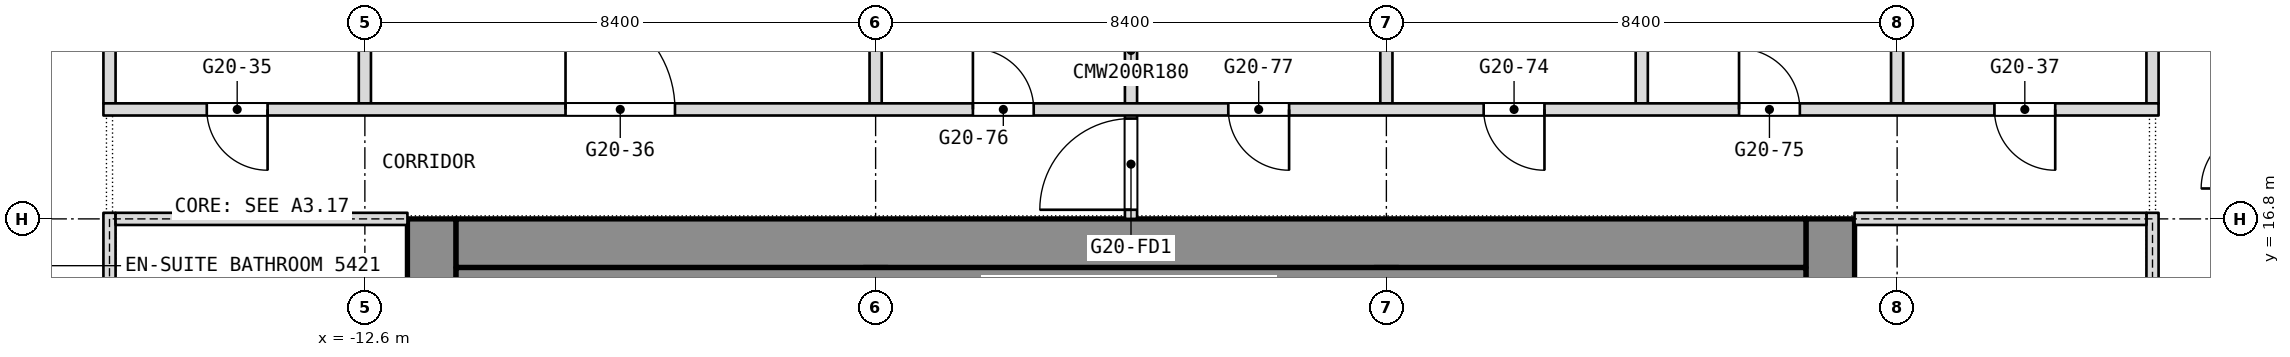
"""IFC4 building model, lengths in metres.
Left out: names, types, materials, properties, quantities, classifications, styles, units other than length and angle.
Written with IfcOpenShell. Run it as: python <this file> out.ifc"""

import sys

from ifc_helpers import new_model, si_unit, direction, frame, frame_2d, origin, place, context, subcontext, project, spatial, rectangle, extrude, element, fill, save


model = new_model("IFC4")
c1 = context("Model", 3, precision=1e-05, world=origin(), true_north=direction((0.0, 1.0)))
c2 = subcontext(c1, "Body", "Model", "MODEL_VIEW")
j1 = project(units=[si_unit("LENGTHUNIT", "METRE"), si_unit("PLANEANGLEUNIT", "RADIAN")], contexts=[c1])
p1 = place(None, origin())
s1 = spatial("IfcSite", under=j1, at=p1, CompositionType="ELEMENT")
p2 = place(p1, origin())
s2 = spatial("IfcBuilding", under=s1, at=p2, CompositionType="ELEMENT")
p3 = place(p2, frame((0.0, 0.0, 230.9)))
s3 = spatial("IfcBuildingStorey", under=s2, at=p3, CompositionType="ELEMENT", Elevation=230.9)
p4 = place(p3, frame((11.5, 0.0, 0.0), z_axis=(0.0, 0.0, 1.0), x_axis=(0.0, 1.0, 0.0)))
e1 = element("IfcWall", 1, at=p4, inside=s3, PredefinedType="SHEAR", context=c2, shape_type="SweptSolid", body=[
    extrude(rectangle(XDim=16.8, YDim=0.8, at=frame_2d((8.4, 0.0))), origin(), (0.0, 0.0, 1.0), 3.6),
])
p5 = place(p4, frame((2.3, 0.0, 0.0)))
e2 = element("IfcOpeningElement", 2, at=p5, cuts=e1, PredefinedType="OPENING", context=c2, shape_type="SweptSolid", body=[
    extrude(rectangle(XDim=1.1, YDim=2.1, at=frame_2d((0.55, 1.05))), frame((0.0, 0.4, 0.0), z_axis=(0.0, -1.0, 0.0), x_axis=(1.0, 0.0, 0.0)), (0.0, 0.0, 1.0), 0.8),
])
p6 = place(p4, frame((4.85, 0.0, 0.0)))
e3 = element("IfcOpeningElement", 3, at=p6, cuts=e1, PredefinedType="OPENING", context=c2, shape_type="SweptSolid", body=[
    extrude(rectangle(XDim=1.1, YDim=2.1, at=frame_2d((0.55, 1.05))), frame((0.0, 0.4, 0.0), z_axis=(0.0, -1.0, 0.0), x_axis=(1.0, 0.0, 0.0)), (0.0, 0.0, 1.0), 0.8),
])
p7 = place(p4, frame((6.825, 0.0, 0.0)))
e4 = element("IfcOpeningElement", 4, at=p7, cuts=e1, PredefinedType="OPENING", context=c2, shape_type="SweptSolid", body=[
    extrude(rectangle(XDim=1.2, YDim=2.1, at=frame_2d((0.6, 1.05))), frame((0.0, 0.4, 0.0), z_axis=(0.0, -1.0, 0.0), x_axis=(1.0, 0.0, 0.0)), (0.0, 0.0, 1.0), 0.8),
])
p8 = place(p4, frame((13.4, 0.0, 0.0)))
e5 = element("IfcOpeningElement", 5, at=p8, cuts=e1, PredefinedType="OPENING", context=c2, shape_type="SweptSolid", body=[
    extrude(rectangle(XDim=1.1, YDim=2.1, at=frame_2d((0.55, 1.05))), frame((0.0, 0.4, 0.0), z_axis=(0.0, -1.0, 0.0), x_axis=(1.0, 0.0, 0.0)), (0.0, 0.0, 1.0), 0.8),
])
p9 = place(p4, frame((10.85, 0.0, 0.0)))
e6 = element("IfcOpeningElement", 6, at=p9, cuts=e1, PredefinedType="OPENING", context=c2, shape_type="SweptSolid", body=[
    extrude(rectangle(XDim=1.1, YDim=2.1, at=frame_2d((0.55, 1.05))), frame((0.0, 0.4, 0.0), z_axis=(0.0, -1.0, 0.0), x_axis=(1.0, 0.0, 0.0)), (0.0, 0.0, 1.0), 0.8),
])
p10 = place(p4, frame((8.775, 0.0, 0.0)))
e7 = element("IfcOpeningElement", 7, at=p10, cuts=e1, PredefinedType="OPENING", context=c2, shape_type="SweptSolid", body=[
    extrude(rectangle(XDim=1.2, YDim=2.1, at=frame_2d((0.6, 1.05))), frame((0.0, 0.4, 0.0), z_axis=(0.0, -1.0, 0.0), x_axis=(1.0, 0.0, 0.0)), (0.0, 0.0, 1.0), 0.8),
])
p11 = place(p3, frame((-11.5, 0.0, 0.0), z_axis=(0.0, 0.0, 1.0), x_axis=(0.0, 1.0, 0.0)))
e8 = element("IfcWall", 8, at=p11, inside=s3, PredefinedType="SHEAR", context=c2, shape_type="SweptSolid", body=[
    extrude(rectangle(XDim=16.8, YDim=0.8, at=frame_2d((8.4, 0.0))), origin(), (0.0, 0.0, 1.0), 3.6),
])
p12 = place(p11, frame((3.6, 0.0, 0.0)))
e9 = element("IfcOpeningElement", 9, at=p12, cuts=e8, PredefinedType="OPENING", context=c2, shape_type="SweptSolid", body=[
    extrude(rectangle(XDim=0.9, YDim=2.1, at=frame_2d((0.45, 1.05))), frame((0.0, 0.4, 0.0), z_axis=(0.0, -1.0, 0.0), x_axis=(1.0, 0.0, 0.0)), (0.0, 0.0, 1.0), 0.8),
])
p13 = place(p11, frame((6.825, 0.0, 0.0)))
e10 = element("IfcOpeningElement", 10, at=p13, cuts=e8, PredefinedType="OPENING", context=c2, shape_type="SweptSolid", body=[
    extrude(rectangle(XDim=1.2, YDim=2.1, at=frame_2d((0.6, 1.05))), frame((0.0, 0.4, 0.0), z_axis=(0.0, -1.0, 0.0), x_axis=(1.0, 0.0, 0.0)), (0.0, 0.0, 1.0), 0.8),
])
p14 = place(p11, frame((14.212, 0.0, 0.0)))
e11 = element("IfcOpeningElement", 11, at=p14, cuts=e8, PredefinedType="OPENING", context=c2, shape_type="SweptSolid", body=[
    extrude(rectangle(XDim=0.9, YDim=2.1, at=frame_2d((0.45, 1.05))), frame((0.0, 0.4, 0.0), z_axis=(0.0, -1.0, 0.0), x_axis=(1.0, 0.0, 0.0)), (0.0, 0.0, 1.0), 0.8),
])
p15 = place(p11, frame((11.587, 0.0, 0.0)))
e12 = element("IfcOpeningElement", 12, at=p15, cuts=e8, PredefinedType="OPENING", context=c2, shape_type="SweptSolid", body=[
    extrude(rectangle(XDim=0.9, YDim=2.1, at=frame_2d((0.45, 1.05))), frame((0.0, 0.4, 0.0), z_axis=(0.0, -1.0, 0.0), x_axis=(1.0, 0.0, 0.0)), (0.0, 0.0, 1.0), 0.8),
])
p16 = place(p11, frame((8.775, 0.0, 0.0)))
e13 = element("IfcOpeningElement", 13, at=p16, cuts=e8, PredefinedType="OPENING", context=c2, shape_type="SweptSolid", body=[
    extrude(rectangle(XDim=1.2, YDim=2.1, at=frame_2d((0.6, 1.05))), frame((0.0, 0.4, 0.0), z_axis=(0.0, -1.0, 0.0), x_axis=(1.0, 0.0, 0.0)), (0.0, 0.0, 1.0), 0.8),
])
p17 = place(p3, frame((-11.1, 16.4, 0.0), z_axis=(0.0, 0.0, 1.0), x_axis=(1.0, 0.0, 0.0)))
e14 = element("IfcWall", 14, at=p17, inside=s3, PredefinedType="SHEAR", context=c2, shape_type="SweptSolid", body=[
    extrude(rectangle(XDim=22.2, YDim=0.8, at=frame_2d((11.1, 0.0))), origin(), (0.0, 0.0, 1.0), 3.6),
])
p18 = place(p3, frame((-4.2, 0.8, 0.0), z_axis=(0.0, 0.0, 1.0), x_axis=(0.0, 1.0, 0.0)))
e15 = element("IfcWall", 15, at=p18, inside=s3, PredefinedType="SHEAR", context=c2, shape_type="SweptSolid", body=[
    extrude(rectangle(XDim=15.2, YDim=0.4, at=frame_2d((7.6, 0.0))), origin(), (0.0, 0.0, 1.0), 3.6),
])
p19 = place(p18, frame((8.5, 0.0, 0.0)))
e16 = element("IfcOpeningElement", 16, at=p19, cuts=e15, PredefinedType="OPENING", context=c2, shape_type="SweptSolid", body=[
    extrude(rectangle(XDim=1.2, YDim=2.1, at=frame_2d((0.6, 1.05))), frame((0.0, 0.2, 0.0), z_axis=(0.0, -1.0, 0.0), x_axis=(1.0, 0.0, 0.0)), (0.0, 0.0, 1.0), 0.4),
])
p20 = place(p3, frame((4.2, 0.8, 0.0), z_axis=(0.0, 0.0, 1.0), x_axis=(0.0, 1.0, 0.0)))
e17 = element("IfcWall", 17, at=p20, inside=s3, PredefinedType="SHEAR", context=c2, shape_type="SweptSolid", body=[
    extrude(rectangle(XDim=15.2, YDim=0.4, at=frame_2d((7.6, 0.0))), origin(), (0.0, 0.0, 1.0), 3.6),
])
p21 = place(p20, frame((5.95, 0.0, 0.0)))
e18 = element("IfcOpeningElement", 18, at=p21, cuts=e17, PredefinedType="OPENING", context=c2, shape_type="SweptSolid", body=[
    extrude(rectangle(XDim=1.2, YDim=2.1, at=frame_2d((0.6, 1.05))), frame((0.0, 0.2, 0.0), z_axis=(0.0, -1.0, 0.0), x_axis=(1.0, 0.0, 0.0)), (0.0, 0.0, 1.0), 0.4),
])
for number, where, z_axis, x_axis in (
    (19, (16.8, 18.7, 0.0), (0.0, 0.0, 1.0), (0.0, 1.0, 0.0)),
    (20, (12.6, 18.7, 0.0), (0.0, 0.0, 1.0), (0.0, 1.0, 0.0)),
    (21, (8.4, 18.7, 0.0), (0.0, 0.0, 1.0), (0.0, 1.0, 0.0)),
    (22, (4.2, 18.7, 0.0), (0.0, 0.0, 1.0), (0.0, 1.0, 0.0)),
):
    element("IfcWall", number, at=place(p3, frame(where, z_axis=z_axis, x_axis=x_axis)), inside=s3, PredefinedType="PARTITIONING", context=c2, shape_type="SweptSolid", body=[
        extrude(rectangle(XDim=3.64, YDim=0.2, at=frame_2d((1.82, 0.0))), origin(), (0.0, 0.0, 1.0), 3.34),
    ])
p22 = place(p3, frame((0.0, 16.8, 0.0), z_axis=(0.0, 0.0, 1.0), x_axis=(0.0, 1.0, 0.0)))
e23 = element("IfcWall", 23, at=p22, inside=s3, PredefinedType="PARTITIONING", context=c2, shape_type="SweptSolid", body=[
    extrude(rectangle(XDim=5.54, YDim=0.2, at=frame_2d((2.77, 0.0))), origin(), (0.0, 0.0, 1.0), 3.34),
])
p23 = place(p22, frame((0.15, 0.0, 0.0)))
e24 = element("IfcOpeningElement", 24, at=p23, cuts=e23, PredefinedType="OPENING", context=c2, shape_type="SweptSolid", body=[
    extrude(rectangle(XDim=1.5, YDim=2.1, at=frame_2d((0.75, 1.05))), frame((0.0, 0.1, 0.0), z_axis=(0.0, -1.0, 0.0), x_axis=(1.0, 0.0, 0.0)), (0.0, 0.0, 1.0), 0.2),
])
for number, where, z_axis, x_axis in (
    (25, (-4.2, 18.7, 0.0), (0.0, 0.0, 1.0), (0.0, 1.0, 0.0)),
    (26, (-12.6, 18.7, 0.0), (0.0, 0.0, 1.0), (0.0, 1.0, 0.0)),
    (27, (-16.8, 18.7, 0.0), (0.0, 0.0, 1.0), (0.0, 1.0, 0.0)),
):
    element("IfcWall", number, at=place(p3, frame(where, z_axis=z_axis, x_axis=x_axis)), inside=s3, PredefinedType="PARTITIONING", context=c2, shape_type="SweptSolid", body=[
        extrude(rectangle(XDim=3.64, YDim=0.2, at=frame_2d((1.82, 0.0))), origin(), (0.0, 0.0, 1.0), 3.34),
    ])
p24 = place(p3, frame((-16.9, 18.6, 0.0), z_axis=(0.0, 0.0, 1.0), x_axis=(1.0, 0.0, 0.0)))
e28 = element("IfcWall", 28, at=p24, inside=s3, PredefinedType="PARTITIONING", context=c2, shape_type="SweptSolid", body=[
    extrude(rectangle(XDim=33.8, YDim=0.2, at=frame_2d((16.9, 0.0))), origin(), (0.0, 0.0, 1.0), 3.34),
])
p25 = place(p24, frame((1.7, 0.0, 0.0)))
e29 = element("IfcOpeningElement", 29, at=p25, cuts=e28, PredefinedType="OPENING", context=c2, shape_type="SweptSolid", body=[
    extrude(rectangle(XDim=1.0, YDim=2.1, at=frame_2d((0.5, 1.05))), frame((0.0, 0.1, 0.0), z_axis=(0.0, -1.0, 0.0), x_axis=(1.0, 0.0, 0.0)), (0.0, 0.0, 1.0), 0.2),
])
p26 = place(p24, frame((7.6, 0.0, 0.0)))
e30 = element("IfcOpeningElement", 30, at=p26, cuts=e28, PredefinedType="OPENING", context=c2, shape_type="SweptSolid", body=[
    extrude(rectangle(XDim=1.8, YDim=2.1, at=frame_2d((0.9, 1.05))), frame((0.0, 0.1, 0.0), z_axis=(0.0, -1.0, 0.0), x_axis=(1.0, 0.0, 0.0)), (0.0, 0.0, 1.0), 0.2),
])
p27 = place(p24, frame((31.1, 0.0, 0.0)))
e31 = element("IfcOpeningElement", 31, at=p27, cuts=e28, PredefinedType="OPENING", context=c2, shape_type="SweptSolid", body=[
    extrude(rectangle(XDim=1.0, YDim=2.1, at=frame_2d((0.5, 1.05))), frame((0.0, 0.1, 0.0), z_axis=(0.0, -1.0, 0.0), x_axis=(1.0, 0.0, 0.0)), (0.0, 0.0, 1.0), 0.2),
])
p28 = place(p24, frame((22.7, 0.0, 0.0)))
e32 = element("IfcOpeningElement", 32, at=p28, cuts=e28, PredefinedType="OPENING", context=c2, shape_type="SweptSolid", body=[
    extrude(rectangle(XDim=1.0, YDim=2.1, at=frame_2d((0.5, 1.05))), frame((0.0, 0.1, 0.0), z_axis=(0.0, -1.0, 0.0), x_axis=(1.0, 0.0, 0.0)), (0.0, 0.0, 1.0), 0.2),
])
p29 = place(p24, frame((26.9, 0.0, 0.0)))
e33 = element("IfcOpeningElement", 33, at=p29, cuts=e28, PredefinedType="OPENING", context=c2, shape_type="SweptSolid", body=[
    extrude(rectangle(XDim=1.0, YDim=2.1, at=frame_2d((0.5, 1.05))), frame((0.0, 0.1, 0.0), z_axis=(0.0, -1.0, 0.0), x_axis=(1.0, 0.0, 0.0)), (0.0, 0.0, 1.0), 0.2),
])
p30 = place(p24, frame((14.3, 0.0, 0.0)))
e34 = element("IfcOpeningElement", 34, at=p30, cuts=e28, PredefinedType="OPENING", context=c2, shape_type="SweptSolid", body=[
    extrude(rectangle(XDim=1.0, YDim=2.1, at=frame_2d((0.5, 1.05))), frame((0.0, 0.1, 0.0), z_axis=(0.0, -1.0, 0.0), x_axis=(1.0, 0.0, 0.0)), (0.0, 0.0, 1.0), 0.2),
])
p31 = place(p24, frame((18.5, 0.0, 0.0)))
e35 = element("IfcOpeningElement", 35, at=p31, cuts=e28, PredefinedType="OPENING", context=c2, shape_type="SweptSolid", body=[
    extrude(rectangle(XDim=1.0, YDim=2.1, at=frame_2d((0.5, 1.05))), frame((0.0, 0.1, 0.0), z_axis=(0.0, -1.0, 0.0), x_axis=(1.0, 0.0, 0.0)), (0.0, 0.0, 1.0), 0.2),
])
p32 = place(p3, frame((-11.1, 15.65, 0.0), z_axis=(0.0, 0.0, 1.0), x_axis=(1.0, 0.0, 0.0)))
e36 = element("IfcWall", 36, at=p32, inside=s3, PredefinedType="PARTITIONING", context=c2, shape_type="SweptSolid", body=[
    extrude(rectangle(XDim=22.2, YDim=0.7, at=frame_2d((11.1, 0.0))), origin(), (0.0, 0.0, 1.0), 3.34),
])
p33 = place(p3, frame((-16.8, -0.1, 0.0), z_axis=(0.0, 0.0, 1.0), x_axis=(0.0, 1.0, 0.0)))
e37 = element("IfcWall", 37, at=p33, inside=s3, PredefinedType="PARTITIONING", context=c2, shape_type="SweptSolid", body=[
    extrude(rectangle(XDim=17.0, YDim=0.2, at=frame_2d((8.5, 0.0))), origin(), (0.0, 0.0, 1.0), 3.34),
])
p34 = place(p33, frame((2.2, 0.0, 0.0)))
e38 = element("IfcOpeningElement", 38, at=p34, cuts=e37, PredefinedType="OPENING", context=c2, shape_type="SweptSolid", body=[
    extrude(rectangle(XDim=1.8, YDim=2.1, at=frame_2d((0.9, 1.05))), frame((0.0, 0.1, 0.0), z_axis=(0.0, -1.0, 0.0), x_axis=(1.0, 0.0, 0.0)), (0.0, 0.0, 1.0), 0.2),
])
p35 = place(p33, frame((13.0, 0.0, 0.0)))
e39 = element("IfcOpeningElement", 39, at=p35, cuts=e37, PredefinedType="OPENING", context=c2, shape_type="SweptSolid", body=[
    extrude(rectangle(XDim=1.8, YDim=2.1, at=frame_2d((0.9, 1.05))), frame((0.0, 0.1, 0.0), z_axis=(0.0, -1.0, 0.0), x_axis=(1.0, 0.0, 0.0)), (0.0, 0.0, 1.0), 0.2),
])
p36 = place(p3, frame((-16.7, 16.8, 0.0), z_axis=(0.0, 0.0, 1.0), x_axis=(1.0, 0.0, 0.0)))
e40 = element("IfcWall", 40, at=p36, inside=s3, PredefinedType="PARTITIONING", context=c2, shape_type="SweptSolid", body=[
    extrude(rectangle(XDim=4.8, YDim=0.2, at=frame_2d((2.4, 0.0))), origin(), (0.0, 0.0, 1.0), 2.94),
])
p37 = place(p3, frame((16.8, -0.1, 0.0), z_axis=(0.0, 0.0, 1.0), x_axis=(0.0, 1.0, 0.0)))
e41 = element("IfcWall", 41, at=p37, inside=s3, PredefinedType="PARTITIONING", context=c2, shape_type="SweptSolid", body=[
    extrude(rectangle(XDim=17.0, YDim=0.2, at=frame_2d((8.5, 0.0))), origin(), (0.0, 0.0, 1.0), 3.34),
])
p38 = place(p37, frame((2.2, 0.0, 0.0)))
e42 = element("IfcOpeningElement", 42, at=p38, cuts=e41, PredefinedType="OPENING", context=c2, shape_type="SweptSolid", body=[
    extrude(rectangle(XDim=1.8, YDim=2.1, at=frame_2d((0.9, 1.05))), frame((0.0, 0.1, 0.0), z_axis=(0.0, -1.0, 0.0), x_axis=(1.0, 0.0, 0.0)), (0.0, 0.0, 1.0), 0.2),
])
p39 = place(p37, frame((13.0, 0.0, 0.0)))
e43 = element("IfcOpeningElement", 43, at=p39, cuts=e41, PredefinedType="OPENING", context=c2, shape_type="SweptSolid", body=[
    extrude(rectangle(XDim=1.8, YDim=2.1, at=frame_2d((0.9, 1.05))), frame((0.0, 0.1, 0.0), z_axis=(0.0, -1.0, 0.0), x_axis=(1.0, 0.0, 0.0)), (0.0, 0.0, 1.0), 0.2),
])
p40 = place(p3, frame((11.9, 16.8, 0.0), z_axis=(0.0, 0.0, 1.0), x_axis=(1.0, 0.0, 0.0)))
e44 = element("IfcWall", 44, at=p40, inside=s3, PredefinedType="PARTITIONING", context=c2, shape_type="SweptSolid", body=[
    extrude(rectangle(XDim=4.8, YDim=0.2, at=frame_2d((2.4, 0.0))), origin(), (0.0, 0.0, 1.0), 2.94),
])
p41 = place(p25, origin())
e45 = element("IfcDoor", 45, at=p41, inside=s3, OperationType="SINGLE_SWING_LEFT", PredefinedType="DOOR", context=c2, shape_type="SweptSolid", body=[
    extrude(rectangle(XDim=1.0, YDim=2.1, at=frame_2d((0.5, 1.05))), frame((0.0, 0.025, 0.0), z_axis=(0.0, -1.0, 0.0), x_axis=(1.0, 0.0, 0.0)), (0.0, 0.0, 1.0), 0.05),
])
fill(e29, e45)
p42 = place(p26, origin())
e46 = element("IfcDoor", 46, at=p42, inside=s3, OperationType="DOUBLE_DOOR_SINGLE_SWING", PredefinedType="DOOR", context=c2, shape_type="SweptSolid", body=[
    extrude(rectangle(XDim=1.8, YDim=2.1, at=frame_2d((0.9, 1.05))), frame((0.0, 0.025, 0.0), z_axis=(0.0, -1.0, 0.0), x_axis=(1.0, 0.0, 0.0)), (0.0, 0.0, 1.0), 0.05),
])
fill(e30, e46)
p43 = place(p27, origin())
e47 = element("IfcDoor", 47, at=p43, inside=s3, OperationType="SINGLE_SWING_LEFT", PredefinedType="DOOR", context=c2, shape_type="SweptSolid", body=[
    extrude(rectangle(XDim=1.0, YDim=2.1, at=frame_2d((0.5, 1.05))), frame((0.0, 0.025, 0.0), z_axis=(0.0, -1.0, 0.0), x_axis=(1.0, 0.0, 0.0)), (0.0, 0.0, 1.0), 0.05),
])
fill(e31, e47)
p44 = place(p28, origin())
e48 = element("IfcDoor", 48, at=p44, inside=s3, OperationType="SINGLE_SWING_RIGHT", PredefinedType="DOOR", context=c2, shape_type="SweptSolid", body=[
    extrude(rectangle(XDim=1.0, YDim=2.1, at=frame_2d((0.5, 1.05))), frame((0.0, 0.025, 0.0), z_axis=(0.0, -1.0, 0.0), x_axis=(1.0, 0.0, 0.0)), (0.0, 0.0, 1.0), 0.05),
])
fill(e32, e48)
p45 = place(p29, origin())
e49 = element("IfcDoor", 49, at=p45, inside=s3, OperationType="SINGLE_SWING_LEFT", PredefinedType="DOOR", context=c2, shape_type="SweptSolid", body=[
    extrude(rectangle(XDim=1.0, YDim=2.1, at=frame_2d((0.5, 1.05))), frame((0.0, 0.025, 0.0), z_axis=(0.0, -1.0, 0.0), x_axis=(1.0, 0.0, 0.0)), (0.0, 0.0, 1.0), 0.05),
])
fill(e33, e49)
p46 = place(p30, origin())
e50 = element("IfcDoor", 50, at=p46, inside=s3, OperationType="SINGLE_SWING_RIGHT", PredefinedType="DOOR", context=c2, shape_type="SweptSolid", body=[
    extrude(rectangle(XDim=1.0, YDim=2.1, at=frame_2d((0.5, 1.05))), frame((0.0, 0.025, 0.0), z_axis=(0.0, -1.0, 0.0), x_axis=(1.0, 0.0, 0.0)), (0.0, 0.0, 1.0), 0.05),
])
fill(e34, e50)
p47 = place(p31, origin())
e51 = element("IfcDoor", 51, at=p47, inside=s3, OperationType="SINGLE_SWING_LEFT", PredefinedType="DOOR", context=c2, shape_type="SweptSolid", body=[
    extrude(rectangle(XDim=1.0, YDim=2.1, at=frame_2d((0.5, 1.05))), frame((0.0, 0.025, 0.0), z_axis=(0.0, -1.0, 0.0), x_axis=(1.0, 0.0, 0.0)), (0.0, 0.0, 1.0), 0.05),
])
fill(e35, e51)
p48 = place(p23, origin())
e52 = element("IfcDoor", 52, at=p48, inside=s3, OperationType="DOUBLE_DOOR_DOUBLE_SWING", PredefinedType="DOOR", context=c2, shape_type="SweptSolid", body=[
    extrude(rectangle(XDim=1.5, YDim=2.1, at=frame_2d((0.75, 1.05))), frame((0.0, 0.025, 0.0), z_axis=(0.0, -1.0, 0.0), x_axis=(1.0, 0.0, 0.0)), (0.0, 0.0, 1.0), 0.05),
])
fill(e24, e52)
save(model, sys.argv[1])
